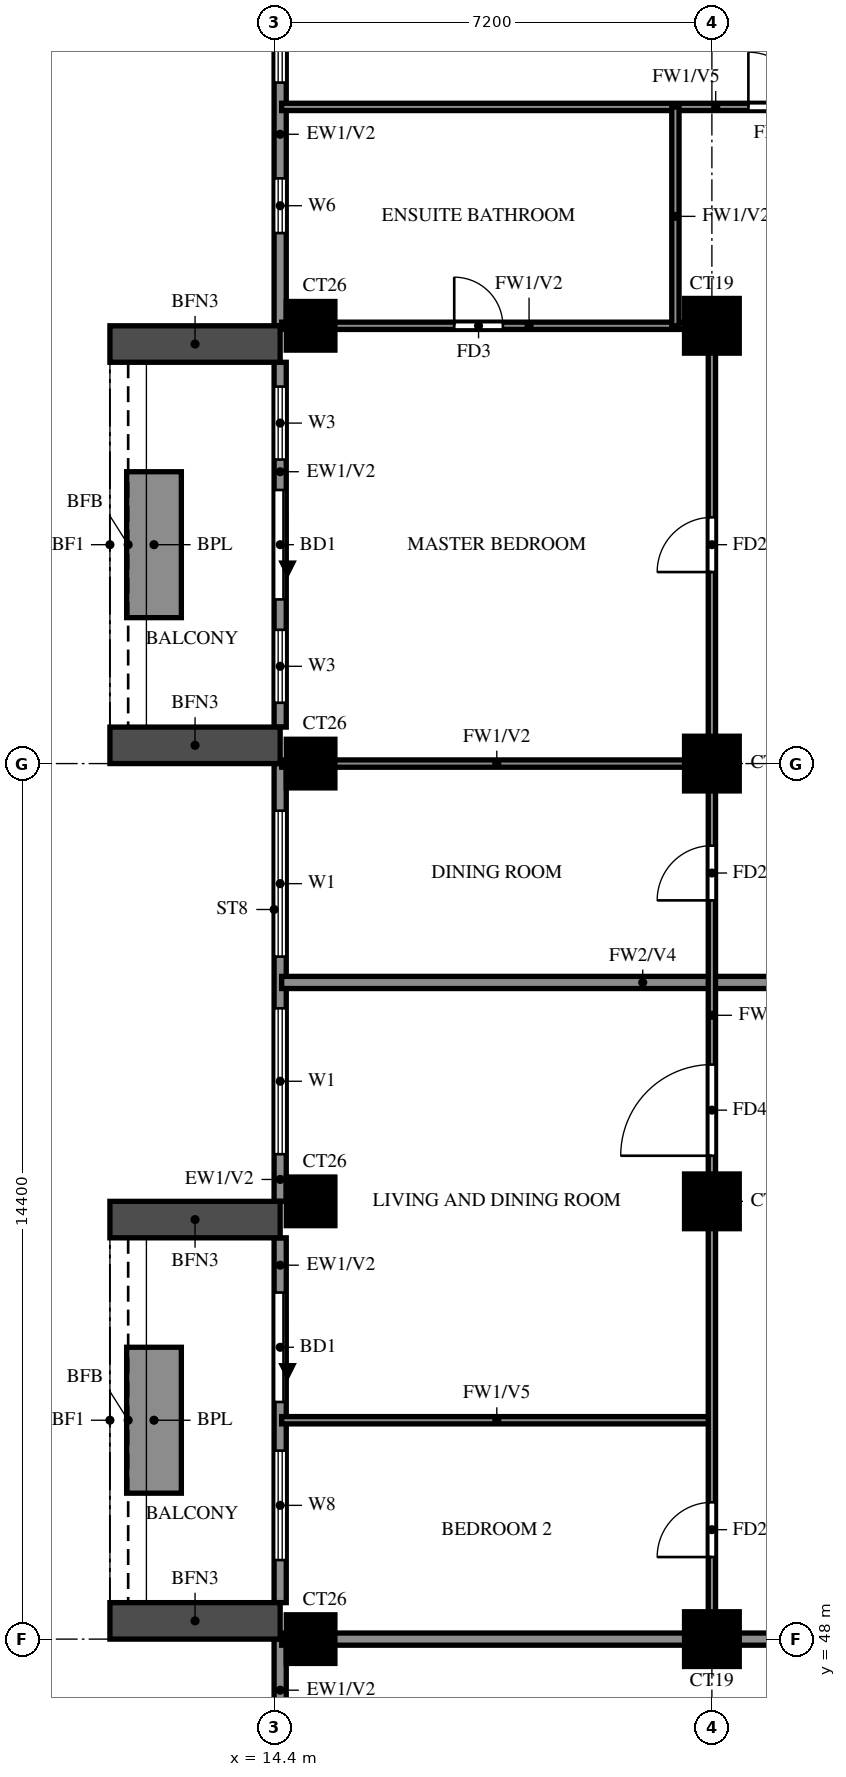
"""IFC4 building model, lengths in metres.
Left out: names, types, materials, properties, quantities, classifications, styles, units other than length and angle.
Written with IfcOpenShell. Run it as: python <this file> out.ifc"""

import sys

from ifc_helpers import new_model, si_unit, direction, frame, frame_2d, origin, origin_2d, place, context, subcontext, project, spatial, rectangle, extrude, source, transform, mapped, element, fill, save


model = new_model("IFC4")
c1 = context("Model", 3, precision=1e-05, world=origin(), true_north=direction((0.0, 1.0)))
c2 = subcontext(c1, "Body", "Model", "MODEL_VIEW")
j1 = project(units=[si_unit("LENGTHUNIT", "METRE"), si_unit("PLANEANGLEUNIT", "RADIAN")], contexts=[c1])
p1 = place(None, origin())
s1 = spatial("IfcSite", under=j1, at=p1, CompositionType="ELEMENT")
p2 = place(p1, origin())
s2 = spatial("IfcBuilding", under=s1, at=p2, CompositionType="ELEMENT")
p3 = place(p2, frame((0.0, 0.0, 174.5)))
s3 = spatial("IfcBuildingStorey", under=s2, at=p3, CompositionType="ELEMENT", Elevation=174.5)
m1 = source(origin(), c2, "Body", "SweptSolid", [
    extrude(rectangle(XDim=0.8, YDim=0.8, at=origin_2d()), origin(), (0.0, 0.0, 1.0), 3.2),
])
p4 = place(p3, frame((15.0, 48.0, 0.0), z_axis=(0.0, 0.0, 1.0), x_axis=(1.0, 0.0, 0.0)))
e1 = element("IfcColumn", 1, at=p4, inside=s3, PredefinedType="COLUMN", context=c2, shape_type="MappedRepresentation", body=[
    mapped(m1, transform((0.0, 0.0, 0.0))),
])
m2 = source(origin(), c2, "Body", "SweptSolid", [
    extrude(rectangle(XDim=0.9, YDim=0.9, at=origin_2d()), origin(), (0.0, 0.0, 1.0), 3.2),
])
p5 = place(p3, frame((21.6, 48.0, 0.0), z_axis=(0.0, 0.0, 1.0), x_axis=(1.0, 0.0, 0.0)))
e2 = element("IfcColumn", 2, at=p5, inside=s3, PredefinedType="COLUMN", context=c2, shape_type="MappedRepresentation", body=[
    mapped(m2, transform((0.0, 0.0, 0.0))),
])
p6 = place(p3, frame((15.0, 55.2, 0.0), z_axis=(0.0, 0.0, 1.0), x_axis=(1.0, 0.0, 0.0)))
e3 = element("IfcColumn", 3, at=p6, inside=s3, PredefinedType="COLUMN", context=c2, shape_type="MappedRepresentation", body=[
    mapped(m1, transform((0.0, 0.0, 0.0))),
])
p7 = place(p3, frame((21.6, 55.2, 0.0), z_axis=(0.0, 0.0, 1.0), x_axis=(1.0, 0.0, 0.0)))
e4 = element("IfcColumn", 4, at=p7, inside=s3, PredefinedType="COLUMN", context=c2, shape_type="MappedRepresentation", body=[
    mapped(m2, transform((0.0, 0.0, 0.0))),
])
p8 = place(p3, frame((15.0, 62.4, 0.0), z_axis=(0.0, 0.0, 1.0), x_axis=(1.0, 0.0, 0.0)))
e5 = element("IfcColumn", 5, at=p8, inside=s3, PredefinedType="COLUMN", context=c2, shape_type="MappedRepresentation", body=[
    mapped(m1, transform((0.0, 0.0, 0.0))),
])
p9 = place(p3, frame((21.6, 62.4, 0.0), z_axis=(0.0, 0.0, 1.0), x_axis=(1.0, 0.0, 0.0)))
e6 = element("IfcColumn", 6, at=p9, inside=s3, PredefinedType="COLUMN", context=c2, shape_type="MappedRepresentation", body=[
    mapped(m2, transform((0.0, 0.0, 0.0))),
])
p10 = place(p3, frame((15.0, 69.6, 0.0), z_axis=(0.0, 0.0, 1.0), x_axis=(1.0, 0.0, 0.0)))
e7 = element("IfcColumn", 7, at=p10, inside=s3, PredefinedType="COLUMN", context=c2, shape_type="MappedRepresentation", body=[
    mapped(m1, transform((0.0, 0.0, 0.0))),
])
p11 = place(p3, frame((21.6, 69.6, 0.0), z_axis=(0.0, 0.0, 1.0), x_axis=(1.0, 0.0, 0.0)))
e8 = element("IfcColumn", 8, at=p11, inside=s3, PredefinedType="COLUMN", context=c2, shape_type="MappedRepresentation", body=[
    mapped(m2, transform((0.0, 0.0, 0.0))),
])
p12 = place(p3, frame((14.5, 76.6, 0.0), z_axis=(0.0, 0.0, 1.0), x_axis=(0.0, -1.0, 0.0)))
e9 = element("IfcWall", 9, at=p12, inside=s3, PredefinedType="SOLIDWALL", context=c2, shape_type="SweptSolid", body=[
    extrude(rectangle(XDim=7.0, YDim=0.2, at=frame_2d((3.5, 0.0))), origin(), (0.0, 0.0, 1.0), 3.2),
])
p13 = place(p12, frame((4.575, 0.0, 1.5)))
e10 = element("IfcOpeningElement", 10, at=p13, cuts=e9, PredefinedType="OPENING", context=c2, shape_type="SweptSolid", body=[
    extrude(rectangle(XDim=0.9, YDim=0.9, at=frame_2d((0.45, 0.45))), frame((0.0, 0.11, 0.0), z_axis=(0.0, -1.0, 0.0), x_axis=(1.0, 0.0, 0.0)), (0.0, 0.0, 1.0), 0.22),
])
p14 = place(p12, frame((0.6, 0.0, 0.6)))
e11 = element("IfcOpeningElement", 11, at=p14, cuts=e9, PredefinedType="OPENING", context=c2, shape_type="SweptSolid", body=[
    extrude(rectangle(XDim=2.4, YDim=2.4, at=frame_2d((1.2, 1.2))), frame((0.0, 0.11, 0.0), z_axis=(0.0, -1.0, 0.0), x_axis=(1.0, 0.0, 0.0)), (0.0, 0.0, 1.0), 0.22),
])
p15 = place(p3, frame((14.5, 69.0, 0.0), z_axis=(0.0, 0.0, 1.0), x_axis=(0.0, -1.0, 0.0)))
e12 = element("IfcWall", 12, at=p15, inside=s3, PredefinedType="SOLIDWALL", context=c2, shape_type="SweptSolid", body=[
    extrude(rectangle(XDim=6.0, YDim=0.2, at=frame_2d((3.0, 0.0))), origin(), (0.0, 0.0, 1.0), 3.2),
])
p16 = place(p15, frame((2.1, 0.0, 0.0)))
e13 = element("IfcOpeningElement", 13, at=p16, cuts=e12, PredefinedType="OPENING", context=c2, shape_type="SweptSolid", body=[
    extrude(rectangle(XDim=1.8, YDim=2.4, at=frame_2d((0.9, 1.2))), frame((0.0, 0.11, 0.0), z_axis=(0.0, -1.0, 0.0), x_axis=(1.0, 0.0, 0.0)), (0.0, 0.0, 1.0), 0.22),
])
p17 = place(p15, frame((0.4, 0.0, 0.6)))
e14 = element("IfcOpeningElement", 14, at=p17, cuts=e12, PredefinedType="OPENING", context=c2, shape_type="SweptSolid", body=[
    extrude(rectangle(XDim=1.2, YDim=2.4, at=frame_2d((0.6, 1.2))), frame((0.0, 0.11, 0.0), z_axis=(0.0, -1.0, 0.0), x_axis=(1.0, 0.0, 0.0)), (0.0, 0.0, 1.0), 0.22),
])
p18 = place(p15, frame((4.4, 0.0, 0.6)))
e15 = element("IfcOpeningElement", 15, at=p18, cuts=e12, PredefinedType="OPENING", context=c2, shape_type="SweptSolid", body=[
    extrude(rectangle(XDim=1.2, YDim=2.4, at=frame_2d((0.6, 1.2))), frame((0.0, 0.11, 0.0), z_axis=(0.0, -1.0, 0.0), x_axis=(1.0, 0.0, 0.0)), (0.0, 0.0, 1.0), 0.22),
])
p19 = place(p3, frame((14.5, 62.4, 0.0), z_axis=(0.0, 0.0, 1.0), x_axis=(0.0, -1.0, 0.0)))
e16 = element("IfcWall", 16, at=p19, inside=s3, PredefinedType="SOLIDWALL", context=c2, shape_type="SweptSolid", body=[
    extrude(rectangle(XDim=7.2, YDim=0.2, at=frame_2d((3.6, 0.0))), origin(), (0.0, 0.0, 1.0), 3.2),
])
p20 = place(p19, frame((4.025, 0.0, 0.6)))
e17 = element("IfcOpeningElement", 17, at=p20, cuts=e16, PredefinedType="OPENING", context=c2, shape_type="SweptSolid", body=[
    extrude(rectangle(XDim=2.4, YDim=2.4, at=frame_2d((1.2, 1.2))), frame((0.0, 0.11, 0.0), z_axis=(0.0, -1.0, 0.0), x_axis=(1.0, 0.0, 0.0)), (0.0, 0.0, 1.0), 0.22),
])
p21 = place(p19, frame((0.775, 0.0, 0.6)))
e18 = element("IfcOpeningElement", 18, at=p21, cuts=e16, PredefinedType="OPENING", context=c2, shape_type="SweptSolid", body=[
    extrude(rectangle(XDim=2.4, YDim=2.4, at=frame_2d((1.2, 1.2))), frame((0.0, 0.11, 0.0), z_axis=(0.0, -1.0, 0.0), x_axis=(1.0, 0.0, 0.0)), (0.0, 0.0, 1.0), 0.22),
])
p22 = place(p3, frame((14.5, 54.6, 0.0), z_axis=(0.0, 0.0, 1.0), x_axis=(0.0, -1.0, 0.0)))
e19 = element("IfcWall", 19, at=p22, inside=s3, PredefinedType="SOLIDWALL", context=c2, shape_type="SweptSolid", body=[
    extrude(rectangle(XDim=6.0, YDim=0.2, at=frame_2d((3.0, 0.0))), origin(), (0.0, 0.0, 1.0), 3.2),
])
p23 = place(p22, frame((0.9, 0.0, 0.0)))
e20 = element("IfcOpeningElement", 20, at=p23, cuts=e19, PredefinedType="OPENING", context=c2, shape_type="SweptSolid", body=[
    extrude(rectangle(XDim=1.8, YDim=2.4, at=frame_2d((0.9, 1.2))), frame((0.0, 0.11, 0.0), z_axis=(0.0, -1.0, 0.0), x_axis=(1.0, 0.0, 0.0)), (0.0, 0.0, 1.0), 0.22),
])
p24 = place(p22, frame((3.5, 0.0, 0.6)))
e21 = element("IfcOpeningElement", 21, at=p24, cuts=e19, PredefinedType="OPENING", context=c2, shape_type="SweptSolid", body=[
    extrude(rectangle(XDim=1.8, YDim=2.4, at=frame_2d((0.9, 1.2))), frame((0.0, 0.11, 0.0), z_axis=(0.0, -1.0, 0.0), x_axis=(1.0, 0.0, 0.0)), (0.0, 0.0, 1.0), 0.22),
])
p25 = place(p3, frame((14.5, 48.0, 0.0), z_axis=(0.0, 0.0, 1.0), x_axis=(0.0, -1.0, 0.0)))
e22 = element("IfcWall", 22, at=p25, inside=s3, PredefinedType="SOLIDWALL", context=c2, shape_type="SweptSolid", body=[
    extrude(rectangle(XDim=4.8, YDim=0.2, at=frame_2d((2.4, 0.0))), origin(), (0.0, 0.0, 1.0), 3.2),
])
p26 = place(p25, frame((1.275, 0.0, 0.6)))
e23 = element("IfcOpeningElement", 23, at=p26, cuts=e22, PredefinedType="OPENING", context=c2, shape_type="SweptSolid", body=[
    extrude(rectangle(XDim=2.4, YDim=2.4, at=frame_2d((1.2, 1.2))), frame((0.0, 0.11, 0.0), z_axis=(0.0, -1.0, 0.0), x_axis=(1.0, 0.0, 0.0)), (0.0, 0.0, 1.0), 0.22),
])
for number, where, z_axis, x_axis in (
    (24, (14.5, 69.3, 0.0), (0.0, 0.0, 1.0), (-1.0, 0.0, 0.0)),
    (25, (14.5, 62.7, 0.0), (0.0, 0.0, 1.0), (-1.0, 0.0, 0.0)),
):
    element("IfcWall", number, at=place(p3, frame(where, z_axis=z_axis, x_axis=x_axis)), inside=s3, PredefinedType="SOLIDWALL", context=c2, shape_type="SweptSolid", body=[
        extrude(rectangle(XDim=2.8, YDim=0.6, at=frame_2d((1.4, 0.0))), origin(), (0.0, 0.0, 1.0), 2.85),
    ])
p27 = place(p3, frame((12.425, 67.2, 0.0), z_axis=(0.0, 0.0, 1.0), x_axis=(0.0, -1.0, 0.0)))
e26 = element("IfcWall", 26, at=p27, inside=s3, PredefinedType="SOLIDWALL", context=c2, shape_type="SweptSolid", body=[
    extrude(rectangle(XDim=2.4, YDim=0.9, at=frame_2d((1.2, 0.0))), origin(), (0.0, 0.0, 1.0), 0.9),
])
for number, where, z_axis, x_axis in (
    (27, (14.5, 54.9, 0.0), (0.0, 0.0, 1.0), (-1.0, 0.0, 0.0)),
    (28, (14.5, 48.3, 0.0), (0.0, 0.0, 1.0), (-1.0, 0.0, 0.0)),
):
    element("IfcWall", number, at=place(p3, frame(where, z_axis=z_axis, x_axis=x_axis)), inside=s3, PredefinedType="SOLIDWALL", context=c2, shape_type="SweptSolid", body=[
        extrude(rectangle(XDim=2.8, YDim=0.6, at=frame_2d((1.4, 0.0))), origin(), (0.0, 0.0, 1.0), 2.85),
    ])
p28 = place(p3, frame((12.425, 52.8, 0.0), z_axis=(0.0, 0.0, 1.0), x_axis=(0.0, -1.0, 0.0)))
e29 = element("IfcWall", 29, at=p28, inside=s3, PredefinedType="SOLIDWALL", context=c2, shape_type="SweptSolid", body=[
    extrude(rectangle(XDim=2.4, YDim=0.9, at=frame_2d((1.2, 0.0))), origin(), (0.0, 0.0, 1.0), 0.9),
])
p29 = place(p3, frame((14.525, 48.0, 0.0), z_axis=(0.0, 0.0, 1.0), x_axis=(1.0, 0.0, 0.0)))
e30 = element("IfcWall", 30, at=p29, inside=s3, PredefinedType="SOLIDWALL", context=c2, shape_type="SweptSolid", body=[
    extrude(rectangle(XDim=19.075, YDim=0.2, at=frame_2d((9.538, 0.0))), origin(), (0.0, 0.0, 1.0), 3.2),
])
p30 = place(p3, frame((14.525, 58.8, 0.0), z_axis=(0.0, 0.0, 1.0), x_axis=(1.0, 0.0, 0.0)))
e31 = element("IfcWall", 31, at=p30, inside=s3, PredefinedType="SOLIDWALL", context=c2, shape_type="SweptSolid", body=[
    extrude(rectangle(XDim=11.875, YDim=0.2, at=frame_2d((5.938, 0.0))), origin(), (0.0, 0.0, 1.0), 2.3),
])
p31 = place(p3, frame((14.525, 51.6, 0.0), z_axis=(0.0, 0.0, 1.0), x_axis=(1.0, 0.0, 0.0)))
e32 = element("IfcWall", 32, at=p31, inside=s3, PredefinedType="PARTITIONING", context=c2, shape_type="SweptSolid", body=[
    extrude(rectangle(XDim=7.075, YDim=0.12, at=frame_2d((3.538, 0.0))), origin(), (0.0, 0.0, 1.0), 2.3),
])
p32 = place(p3, frame((14.525, 62.4, 0.0), z_axis=(0.0, 0.0, 1.0), x_axis=(1.0, 0.0, 0.0)))
e33 = element("IfcWall", 33, at=p32, inside=s3, PredefinedType="PARTITIONING", context=c2, shape_type="SweptSolid", body=[
    extrude(rectangle(XDim=7.075, YDim=0.12, at=frame_2d((3.538, 0.0))), origin(), (0.0, 0.0, 1.0), 3.2),
])
p33 = place(p3, frame((14.525, 69.6, 0.0), z_axis=(0.0, 0.0, 1.0), x_axis=(1.0, 0.0, 0.0)))
e34 = element("IfcWall", 34, at=p33, inside=s3, PredefinedType="PARTITIONING", context=c2, shape_type="SweptSolid", body=[
    extrude(rectangle(XDim=7.075, YDim=0.12, at=frame_2d((3.538, 0.0))), origin(), (0.0, 0.0, 1.0), 3.2),
])
p34 = place(p33, frame((2.837, 0.0, 0.0)))
e35 = element("IfcOpeningElement", 35, at=p34, cuts=e34, PredefinedType="OPENING", context=c2, shape_type="SweptSolid", body=[
    extrude(rectangle(XDim=0.8, YDim=2.1, at=frame_2d((0.4, 1.05))), frame((0.0, 0.07, 0.0), z_axis=(0.0, -1.0, 0.0), x_axis=(1.0, 0.0, 0.0)), (0.0, 0.0, 1.0), 0.14),
])
p35 = place(p3, frame((14.525, 73.2, 0.0), z_axis=(0.0, 0.0, 1.0), x_axis=(1.0, 0.0, 0.0)))
e36 = element("IfcWall", 36, at=p35, inside=s3, PredefinedType="PARTITIONING", context=c2, shape_type="SweptSolid", body=[
    extrude(rectangle(XDim=14.275, YDim=0.12, at=frame_2d((7.138, 0.0))), origin(), (0.0, 0.0, 1.0), 2.3),
])
p36 = place(p35, frame((7.675, 0.0, 0.0)))
e37 = element("IfcOpeningElement", 37, at=p36, cuts=e36, PredefinedType="OPENING", context=c2, shape_type="SweptSolid", body=[
    extrude(rectangle(XDim=0.9, YDim=2.1, at=frame_2d((0.45, 1.05))), frame((0.0, 0.07, 0.0), z_axis=(0.0, -1.0, 0.0), x_axis=(1.0, 0.0, 0.0)), (0.0, 0.0, 1.0), 0.14),
])
p37 = place(p3, frame((21.0, 69.6, 0.0), z_axis=(0.0, 0.0, 1.0), x_axis=(0.0, 1.0, 0.0)))
e38 = element("IfcWall", 38, at=p37, inside=s3, PredefinedType="PARTITIONING", context=c2, shape_type="SweptSolid", body=[
    extrude(rectangle(XDim=3.6, YDim=0.12, at=frame_2d((1.8, 0.0))), origin(), (0.0, 0.0, 1.0), 3.2),
])
p38 = place(p3, frame((21.6, 48.0, 0.0), z_axis=(0.0, 0.0, 1.0), x_axis=(0.0, 1.0, 0.0)))
e39 = element("IfcWall", 39, at=p38, inside=s3, PredefinedType="PARTITIONING", context=c2, shape_type="SweptSolid", body=[
    extrude(rectangle(XDim=21.6, YDim=0.12, at=frame_2d((10.8, 0.0))), origin(), (0.0, 0.0, 1.0), 3.2),
])
p39 = place(p38, frame((1.35, 0.0, 0.0)))
e40 = element("IfcOpeningElement", 40, at=p39, cuts=e39, PredefinedType="OPENING", context=c2, shape_type="SweptSolid", body=[
    extrude(rectangle(XDim=0.9, YDim=2.1, at=frame_2d((0.45, 1.05))), frame((0.0, 0.07, 0.0), z_axis=(0.0, -1.0, 0.0), x_axis=(1.0, 0.0, 0.0)), (0.0, 0.0, 1.0), 0.14),
])
p40 = place(p38, frame((7.95, 0.0, 0.0)))
e41 = element("IfcOpeningElement", 41, at=p40, cuts=e39, PredefinedType="OPENING", context=c2, shape_type="SweptSolid", body=[
    extrude(rectangle(XDim=1.5, YDim=2.1, at=frame_2d((0.75, 1.05))), frame((0.0, 0.07, 0.0), z_axis=(0.0, -1.0, 0.0), x_axis=(1.0, 0.0, 0.0)), (0.0, 0.0, 1.0), 0.14),
])
p41 = place(p38, frame((12.15, 0.0, 0.0)))
e42 = element("IfcOpeningElement", 42, at=p41, cuts=e39, PredefinedType="OPENING", context=c2, shape_type="SweptSolid", body=[
    extrude(rectangle(XDim=0.9, YDim=2.1, at=frame_2d((0.45, 1.05))), frame((0.0, 0.07, 0.0), z_axis=(0.0, -1.0, 0.0), x_axis=(1.0, 0.0, 0.0)), (0.0, 0.0, 1.0), 0.14),
])
p42 = place(p38, frame((17.55, 0.0, 0.0)))
e43 = element("IfcOpeningElement", 43, at=p42, cuts=e39, PredefinedType="OPENING", context=c2, shape_type="SweptSolid", body=[
    extrude(rectangle(XDim=0.9, YDim=2.1, at=frame_2d((0.45, 1.05))), frame((0.0, 0.07, 0.0), z_axis=(0.0, -1.0, 0.0), x_axis=(1.0, 0.0, 0.0)), (0.0, 0.0, 1.0), 0.14),
])
p43 = place(p13, origin())
e44 = element("IfcWindow", 44, at=p43, inside=s3, PartitioningType="SINGLE_PANEL", PredefinedType="WINDOW", context=c2, shape_type="SweptSolid", body=[
    extrude(rectangle(XDim=0.9, YDim=0.9, at=frame_2d((0.45, 0.45))), frame((0.0, 0.03, 0.0), z_axis=(0.0, -1.0, 0.0), x_axis=(1.0, 0.0, 0.0)), (0.0, 0.0, 1.0), 0.06),
])
fill(e10, e44)
p44 = place(p14, origin())
e45 = element("IfcWindow", 45, at=p44, inside=s3, PartitioningType="DOUBLE_PANEL_VERTICAL", PredefinedType="WINDOW", context=c2, shape_type="SweptSolid", body=[
    extrude(rectangle(XDim=2.4, YDim=2.4, at=frame_2d((1.2, 1.2))), frame((0.0, 0.03, 0.0), z_axis=(0.0, -1.0, 0.0), x_axis=(1.0, 0.0, 0.0)), (0.0, 0.0, 1.0), 0.06),
])
fill(e11, e45)
p45 = place(p16, origin())
e46 = element("IfcDoor", 46, at=p45, inside=s3, OperationType="DOUBLE_DOOR_SLIDING", PredefinedType="DOOR", context=c2, shape_type="SweptSolid", body=[
    extrude(rectangle(XDim=1.8, YDim=2.4, at=frame_2d((0.9, 1.2))), frame((0.0, 0.025, 0.0), z_axis=(0.0, -1.0, 0.0), x_axis=(1.0, 0.0, 0.0)), (0.0, 0.0, 1.0), 0.05),
])
fill(e13, e46)
p46 = place(p17, origin())
e47 = element("IfcWindow", 47, at=p46, inside=s3, PartitioningType="SINGLE_PANEL", PredefinedType="WINDOW", context=c2, shape_type="SweptSolid", body=[
    extrude(rectangle(XDim=1.2, YDim=2.4, at=frame_2d((0.6, 1.2))), frame((0.0, 0.03, 0.0), z_axis=(0.0, -1.0, 0.0), x_axis=(1.0, 0.0, 0.0)), (0.0, 0.0, 1.0), 0.06),
])
fill(e14, e47)
p47 = place(p18, origin())
e48 = element("IfcWindow", 48, at=p47, inside=s3, PartitioningType="SINGLE_PANEL", PredefinedType="WINDOW", context=c2, shape_type="SweptSolid", body=[
    extrude(rectangle(XDim=1.2, YDim=2.4, at=frame_2d((0.6, 1.2))), frame((0.0, 0.03, 0.0), z_axis=(0.0, -1.0, 0.0), x_axis=(1.0, 0.0, 0.0)), (0.0, 0.0, 1.0), 0.06),
])
fill(e15, e48)
p48 = place(p20, origin())
e49 = element("IfcWindow", 49, at=p48, inside=s3, PartitioningType="DOUBLE_PANEL_VERTICAL", PredefinedType="WINDOW", context=c2, shape_type="SweptSolid", body=[
    extrude(rectangle(XDim=2.4, YDim=2.4, at=frame_2d((1.2, 1.2))), frame((0.0, 0.03, 0.0), z_axis=(0.0, -1.0, 0.0), x_axis=(1.0, 0.0, 0.0)), (0.0, 0.0, 1.0), 0.06),
])
fill(e17, e49)
p49 = place(p21, origin())
e50 = element("IfcWindow", 50, at=p49, inside=s3, PartitioningType="DOUBLE_PANEL_VERTICAL", PredefinedType="WINDOW", context=c2, shape_type="SweptSolid", body=[
    extrude(rectangle(XDim=2.4, YDim=2.4, at=frame_2d((1.2, 1.2))), frame((0.0, 0.03, 0.0), z_axis=(0.0, -1.0, 0.0), x_axis=(1.0, 0.0, 0.0)), (0.0, 0.0, 1.0), 0.06),
])
fill(e18, e50)
p50 = place(p23, origin())
e51 = element("IfcDoor", 51, at=p50, inside=s3, OperationType="DOUBLE_DOOR_SLIDING", PredefinedType="DOOR", context=c2, shape_type="SweptSolid", body=[
    extrude(rectangle(XDim=1.8, YDim=2.4, at=frame_2d((0.9, 1.2))), frame((0.0, 0.025, 0.0), z_axis=(0.0, -1.0, 0.0), x_axis=(1.0, 0.0, 0.0)), (0.0, 0.0, 1.0), 0.05),
])
fill(e20, e51)
p51 = place(p24, origin())
e52 = element("IfcWindow", 52, at=p51, inside=s3, PartitioningType="DOUBLE_PANEL_VERTICAL", PredefinedType="WINDOW", context=c2, shape_type="SweptSolid", body=[
    extrude(rectangle(XDim=1.8, YDim=2.4, at=frame_2d((0.9, 1.2))), frame((0.0, 0.03, 0.0), z_axis=(0.0, -1.0, 0.0), x_axis=(1.0, 0.0, 0.0)), (0.0, 0.0, 1.0), 0.06),
])
fill(e21, e52)
p52 = place(p39, origin())
e53 = element("IfcDoor", 53, at=p52, inside=s3, OperationType="SINGLE_SWING_RIGHT", PredefinedType="DOOR", context=c2, shape_type="SweptSolid", body=[
    extrude(rectangle(XDim=0.9, YDim=2.1, at=frame_2d((0.45, 1.05))), frame((0.0, 0.025, 0.0), z_axis=(0.0, -1.0, 0.0), x_axis=(1.0, 0.0, 0.0)), (0.0, 0.0, 1.0), 0.05),
])
fill(e40, e53)
p53 = place(p40, origin())
e54 = element("IfcDoor", 54, at=p53, inside=s3, OperationType="SINGLE_SWING_RIGHT", PredefinedType="DOOR", context=c2, shape_type="SweptSolid", body=[
    extrude(rectangle(XDim=1.5, YDim=2.1, at=frame_2d((0.75, 1.05))), frame((0.0, 0.025, 0.0), z_axis=(0.0, -1.0, 0.0), x_axis=(1.0, 0.0, 0.0)), (0.0, 0.0, 1.0), 0.05),
])
fill(e41, e54)
p54 = place(p41, origin())
e55 = element("IfcDoor", 55, at=p54, inside=s3, OperationType="SINGLE_SWING_LEFT", PredefinedType="DOOR", context=c2, shape_type="SweptSolid", body=[
    extrude(rectangle(XDim=0.9, YDim=2.1, at=frame_2d((0.45, 1.05))), frame((0.0, 0.025, 0.0), z_axis=(0.0, -1.0, 0.0), x_axis=(1.0, 0.0, 0.0)), (0.0, 0.0, 1.0), 0.05),
])
fill(e42, e55)
p55 = place(p42, origin())
e56 = element("IfcDoor", 56, at=p55, inside=s3, OperationType="SINGLE_SWING_LEFT", PredefinedType="DOOR", context=c2, shape_type="SweptSolid", body=[
    extrude(rectangle(XDim=0.9, YDim=2.1, at=frame_2d((0.45, 1.05))), frame((0.0, 0.025, 0.0), z_axis=(0.0, -1.0, 0.0), x_axis=(1.0, 0.0, 0.0)), (0.0, 0.0, 1.0), 0.05),
])
fill(e43, e56)
p56 = place(p34, origin())
e57 = element("IfcDoor", 57, at=p56, inside=s3, OperationType="SINGLE_SWING_RIGHT", PredefinedType="DOOR", context=c2, shape_type="SweptSolid", body=[
    extrude(rectangle(XDim=0.8, YDim=2.1, at=frame_2d((0.4, 1.05))), frame((0.0, 0.025, 0.0), z_axis=(0.0, -1.0, 0.0), x_axis=(1.0, 0.0, 0.0)), (0.0, 0.0, 1.0), 0.05),
])
fill(e35, e57)
p57 = place(p36, origin())
e58 = element("IfcDoor", 58, at=p57, inside=s3, OperationType="SINGLE_SWING_LEFT", PredefinedType="DOOR", context=c2, shape_type="SweptSolid", body=[
    extrude(rectangle(XDim=0.9, YDim=2.1, at=frame_2d((0.45, 1.05))), frame((0.0, 0.025, 0.0), z_axis=(0.0, -1.0, 0.0), x_axis=(1.0, 0.0, 0.0)), (0.0, 0.0, 1.0), 0.05),
])
fill(e37, e58)
save(model, sys.argv[1])
